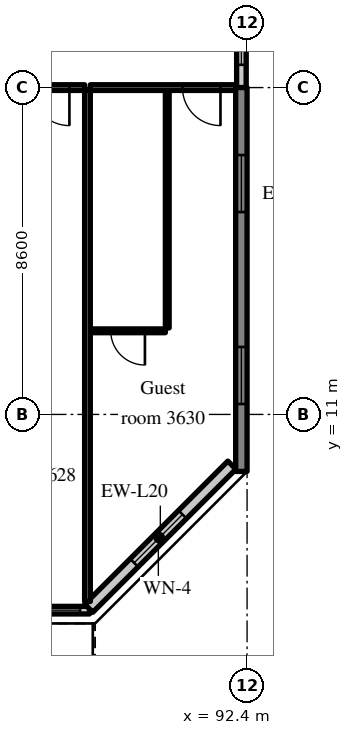
"""IFC4 building model, lengths in metres.
Left out: names, types, materials, properties, quantities, classifications, styles, units other than length and angle.
Written with IfcOpenShell. Run it as: python <this file> out.ifc"""

import sys

from ifc_helpers import new_model, si_unit, direction, frame, frame_2d, origin, place, context, subcontext, project, spatial, rectangle, extrude, source, transform, mapped, element, fill, save


model = new_model("IFC4")
c1 = context("Model", 3, precision=1e-05, world=origin(), true_north=direction((0.0, 1.0)))
c2 = subcontext(c1, "Body", "Model", "MODEL_VIEW")
j1 = project(units=[si_unit("LENGTHUNIT", "METRE"), si_unit("PLANEANGLEUNIT", "RADIAN")], contexts=[c1])
p1 = place(None, origin())
s1 = spatial("IfcSite", under=j1, at=p1, CompositionType="ELEMENT")
p2 = place(p1, origin())
s2 = spatial("IfcBuilding", under=s1, at=p2, CompositionType="ELEMENT")
p3 = place(p2, frame((0.0, 0.0, 151.6)))
s3 = spatial("IfcBuildingStorey", under=s2, at=p3, CompositionType="ELEMENT", Elevation=151.6)
m1 = source(origin(), c2, "Body", "SweptSolid", [
    extrude(rectangle(XDim=10.1, YDim=0.3, at=frame_2d((5.05, 0.0))), origin(), (0.0, 0.0, 1.0), 3.52),
])
p4 = place(p3, frame((92.25, 9.5, 0.0), z_axis=(0.0, 0.0, 1.0), x_axis=(0.0, 1.0, 0.0)))
e1 = element("IfcWall", 1, at=p4, inside=s3, PredefinedType="SHEAR", context=c2, shape_type="MappedRepresentation", body=[
    mapped(m1, transform((0.0, 0.0, 0.0), scale=1.0)),
])
m2 = source(origin(), c2, "Body", "SweptSolid", [
    extrude(rectangle(XDim=1.5, YDim=1.5, at=frame_2d((0.75, 0.75))), frame((0.0, 0.16, 0.0), z_axis=(0.0, -1.0, 0.0), x_axis=(1.0, 0.0, 0.0)), (0.0, 0.0, 1.0), 0.32),
])
p5 = place(p4, frame((1.775, 0.0, 0.9)))
e2 = element("IfcOpeningElement", 2, at=p5, cuts=e1, PredefinedType="OPENING", context=c2, shape_type="MappedRepresentation", body=[
    mapped(m2, transform((0.0, 0.0, 0.0), scale=1.0)),
])
p6 = place(p4, frame((6.825, 0.0, 0.9)))
e3 = element("IfcOpeningElement", 3, at=p6, cuts=e1, PredefinedType="OPENING", context=c2, shape_type="MappedRepresentation", body=[
    mapped(m2, transform((0.0, 0.0, 0.0), scale=1.0)),
])
m3 = source(origin(), c2, "Body", "SweptSolid", [
    extrude(rectangle(XDim=4.105, YDim=0.2, at=frame_2d((2.052, 0.0))), origin(), (0.0, 0.0, 1.0), 2.87),
])
p7 = place(p3, frame((84.15, 5.85, 0.0), z_axis=(0.0, 0.0, 1.0), x_axis=(1.0, 0.0, 0.0)))
e4 = element("IfcWall", 4, at=p7, inside=s3, PredefinedType="SOLIDWALL", context=c2, shape_type="MappedRepresentation", body=[
    mapped(m3, transform((0.0, 0.0, 0.0), scale=1.0)),
])
m4 = source(origin(), c2, "Body", "SweptSolid", [
    extrude(rectangle(XDim=1.2, YDim=2.4, at=frame_2d((0.6, 1.2))), frame((0.0, 0.11, 0.0), z_axis=(0.0, -1.0, 0.0), x_axis=(1.0, 0.0, 0.0)), (0.0, 0.0, 1.0), 0.22),
])
p8 = place(p7, frame((0.25, 0.0, 0.0)))
e5 = element("IfcOpeningElement", 5, at=p8, cuts=e4, PredefinedType="OPENING", context=c2, shape_type="MappedRepresentation", body=[
    mapped(m4, transform((0.0, 0.0, 0.0), scale=1.0)),
])
m5 = source(origin(), c2, "Body", "SweptSolid", [
    extrude(rectangle(XDim=1.5, YDim=1.5, at=frame_2d((0.75, 0.75))), frame((0.0, 0.11, 0.0), z_axis=(0.0, -1.0, 0.0), x_axis=(1.0, 0.0, 0.0)), (0.0, 0.0, 1.0), 0.22),
])
p9 = place(p7, frame((2.355, 0.0, 0.9)))
e6 = element("IfcOpeningElement", 6, at=p9, cuts=e4, PredefinedType="OPENING", context=c2, shape_type="MappedRepresentation", body=[
    mapped(m5, transform((0.0, 0.0, 0.0), scale=1.0)),
])
m6 = source(origin(), c2, "Body", "SweptSolid", [
    extrude(rectangle(XDim=5.326, YDim=0.3, at=frame_2d((2.663, 0.0))), origin(), (0.0, 0.0, 1.0), 3.52),
])
p10 = place(p3, frame((88.234, 5.9, 0.0), z_axis=(0.0, 0.0, 1.0), x_axis=(0.707083859269, 0.707129702361, 0.0)))
e7 = element("IfcWall", 7, at=p10, inside=s3, PredefinedType="SOLIDWALL", context=c2, shape_type="MappedRepresentation", body=[
    mapped(m6, transform((0.0, 0.0, 0.0), scale=1.0)),
])
m7 = source(origin(), c2, "Body", "SweptSolid", [
    extrude(rectangle(XDim=1.8, YDim=1.5, at=frame_2d((0.9, 0.75))), frame((0.0, 0.16, 0.0), z_axis=(0.0, -1.0, 0.0), x_axis=(1.0, 0.0, 0.0)), (0.0, 0.0, 1.0), 0.32),
])
p11 = place(p10, frame((1.689, 0.0, 0.9)))
e8 = element("IfcOpeningElement", 8, at=p11, cuts=e7, PredefinedType="OPENING", context=c2, shape_type="MappedRepresentation", body=[
    mapped(m7, transform((0.0, 0.0, 0.0), scale=1.0)),
])
m8 = source(origin(), c2, "Body", "SweptSolid", [
    extrude(rectangle(XDim=2.4, YDim=0.25, at=frame_2d((1.2, 0.0))), origin(), (0.0, 0.0, 1.0), 2.62),
])
p12 = place(p3, frame((92.25, 19.6, 0.0), z_axis=(0.0, 0.0, 1.0), x_axis=(0.0, 1.0, 0.0)))
e9 = element("IfcWall", 9, at=p12, inside=s3, PredefinedType="SOLIDWALL", context=c2, shape_type="MappedRepresentation", body=[
    mapped(m8, transform((0.0, 0.0, 0.0), scale=1.0)),
])
m9 = source(origin(), c2, "Body", "SweptSolid", [
    extrude(rectangle(XDim=1.2, YDim=1.5, at=frame_2d((0.6, 0.75))), frame((0.0, 0.135, 0.0), z_axis=(0.0, -1.0, 0.0), x_axis=(1.0, 0.0, 0.0)), (0.0, 0.0, 1.0), 0.27),
])
p13 = place(p12, frame((0.6, 0.0, 0.9)))
e10 = element("IfcOpeningElement", 10, at=p13, cuts=e9, PredefinedType="OPENING", context=c2, shape_type="MappedRepresentation", body=[
    mapped(m9, transform((0.0, 0.0, 0.0), scale=1.0)),
])
m10 = source(origin(), c2, "Body", "SweptSolid", [
    extrude(rectangle(XDim=3.975, YDim=0.15, at=frame_2d((1.988, 0.0))), origin(), (0.0, 0.0, 1.0), 2.82),
])
p14 = place(p3, frame((84.15, 19.6, 0.0), z_axis=(0.0, 0.0, 1.0), x_axis=(1.0, 0.0, 0.0)))
e11 = element("IfcWall", 11, at=p14, inside=s3, PredefinedType="PARTITIONING", context=c2, shape_type="MappedRepresentation", body=[
    mapped(m10, transform((0.0, 0.0, 0.0), scale=1.0)),
])
m11 = source(origin(), c2, "Body", "SweptSolid", [
    extrude(rectangle(XDim=1.0, YDim=2.1, at=frame_2d((0.5, 1.05))), frame((0.0, 0.085, 0.0), z_axis=(0.0, -1.0, 0.0), x_axis=(1.0, 0.0, 0.0)), (0.0, 0.0, 1.0), 0.17),
])
p15 = place(p14, frame((2.575, 0.0, 0.0)))
e12 = element("IfcOpeningElement", 12, at=p15, cuts=e11, PredefinedType="OPENING", context=c2, shape_type="MappedRepresentation", body=[
    mapped(m11, transform((0.0, 0.0, 0.0), scale=1.0)),
])
m12 = source(origin(), c2, "Body", "SweptSolid", [
    extrude(rectangle(XDim=6.25, YDim=0.1, at=frame_2d((3.125, 0.0))), origin(), (0.0, 0.0, 1.0), 3.52),
])
p16 = place(p3, frame((90.3, 13.275, 0.0), z_axis=(0.0, 0.0, 1.0), x_axis=(0.0, 1.0, 0.0)))
e13 = element("IfcWall", 13, at=p16, inside=s3, PredefinedType="PARTITIONING", context=c2, shape_type="MappedRepresentation", body=[
    mapped(m12, transform((0.0, 0.0, 0.0), scale=1.0)),
])
m13 = source(origin(), c2, "Body", "SweptSolid", [
    extrude(rectangle(XDim=1.975, YDim=0.1, at=frame_2d((0.988, 0.0))), origin(), (0.0, 0.0, 1.0), 3.52),
])
p17 = place(p3, frame((88.275, 13.2, 0.0), z_axis=(0.0, 0.0, 1.0), x_axis=(1.0, 0.0, 0.0)))
e14 = element("IfcWall", 14, at=p17, inside=s3, PredefinedType="PARTITIONING", context=c2, shape_type="MappedRepresentation", body=[
    mapped(m13, transform((0.0, 0.0, 0.0), scale=1.0)),
])
m14 = source(origin(), c2, "Body", "SweptSolid", [
    extrude(rectangle(XDim=0.9, YDim=2.1, at=frame_2d((0.45, 1.05))), frame((0.0, 0.06, 0.0), z_axis=(0.0, -1.0, 0.0), x_axis=(1.0, 0.0, 0.0)), (0.0, 0.0, 1.0), 0.12),
])
p18 = place(p17, frame((0.537, 0.0, 0.0)))
e15 = element("IfcOpeningElement", 15, at=p18, cuts=e14, PredefinedType="OPENING", context=c2, shape_type="MappedRepresentation", body=[
    mapped(m14, transform((0.0, 0.0, 0.0), scale=1.0)),
])
m15 = source(origin(), c2, "Body", "SweptSolid", [
    extrude(rectangle(XDim=3.825, YDim=0.15, at=frame_2d((1.913, 0.0))), origin(), (0.0, 0.0, 1.0), 2.82),
])
p19 = place(p3, frame((88.275, 19.6, 0.0), z_axis=(0.0, 0.0, 1.0), x_axis=(1.0, 0.0, 0.0)))
e16 = element("IfcWall", 16, at=p19, inside=s3, PredefinedType="PARTITIONING", context=c2, shape_type="MappedRepresentation", body=[
    mapped(m15, transform((0.0, 0.0, 0.0), scale=1.0)),
])
p20 = place(p19, frame((2.425, 0.0, 0.0)))
e17 = element("IfcOpeningElement", 17, at=p20, cuts=e16, PredefinedType="OPENING", context=c2, shape_type="MappedRepresentation", body=[
    mapped(m11, transform((0.0, 0.0, 0.0), scale=1.0)),
])
m16 = source(origin(), c2, "Body", "SweptSolid", [
    extrude(rectangle(XDim=13.447, YDim=0.15, at=frame_2d((6.724, 0.0))), origin(), (0.0, 0.0, 1.0), 3.52),
])
p21 = place(p3, frame((88.2, 6.078, 0.0), z_axis=(0.0, 0.0, 1.0), x_axis=(0.0, 1.0, 0.0)))
e18 = element("IfcWall", 18, at=p21, inside=s3, PredefinedType="PARTITIONING", context=c2, shape_type="MappedRepresentation", body=[
    mapped(m16, transform((0.0, 0.0, 0.0), scale=1.0)),
])
m17 = source(origin(), c2, "Body", "SweptSolid", [
    extrude(rectangle(XDim=1.5, YDim=1.5, at=frame_2d((0.75, 0.75))), frame((0.0, 0.03, 0.0), z_axis=(0.0, -1.0, 0.0), x_axis=(1.0, 0.0, 0.0)), (0.0, 0.0, 1.0), 0.06),
])
p22 = place(p9, origin())
e19 = element("IfcWindow", 19, at=p22, inside=s3, PartitioningType="SINGLE_PANEL", PredefinedType="WINDOW", context=c2, shape_type="MappedRepresentation", body=[
    mapped(m17, transform((0.0, 0.0, 0.0), scale=1.0)),
])
fill(e6, e19)
m18 = source(origin(), c2, "Body", "SweptSolid", [
    extrude(rectangle(XDim=1.8, YDim=1.5, at=frame_2d((0.9, 0.75))), frame((0.0, 0.03, 0.0), z_axis=(0.0, -1.0, 0.0), x_axis=(1.0, 0.0, 0.0)), (0.0, 0.0, 1.0), 0.06),
])
p23 = place(p11, origin())
e20 = element("IfcWindow", 20, at=p23, inside=s3, PartitioningType="SINGLE_PANEL", PredefinedType="WINDOW", context=c2, shape_type="MappedRepresentation", body=[
    mapped(m18, transform((0.0, 0.0, 0.0), scale=1.0)),
])
fill(e8, e20)
p24 = place(p5, origin())
e21 = element("IfcWindow", 21, at=p24, inside=s3, PartitioningType="SINGLE_PANEL", PredefinedType="WINDOW", context=c2, shape_type="MappedRepresentation", body=[
    mapped(m17, transform((0.0, 0.0, 0.0), scale=1.0)),
])
fill(e2, e21)
p25 = place(p6, origin())
e22 = element("IfcWindow", 22, at=p25, inside=s3, PartitioningType="SINGLE_PANEL", PredefinedType="WINDOW", context=c2, shape_type="MappedRepresentation", body=[
    mapped(m17, transform((0.0, 0.0, 0.0), scale=1.0)),
])
fill(e3, e22)
m19 = source(origin(), c2, "Body", "SweptSolid", [
    extrude(rectangle(XDim=1.2, YDim=1.5, at=frame_2d((0.6, 0.75))), frame((0.0, 0.03, 0.0), z_axis=(0.0, -1.0, 0.0), x_axis=(1.0, 0.0, 0.0)), (0.0, 0.0, 1.0), 0.06),
])
p26 = place(p13, origin())
e23 = element("IfcWindow", 23, at=p26, inside=s3, PartitioningType="SINGLE_PANEL", PredefinedType="WINDOW", context=c2, shape_type="MappedRepresentation", body=[
    mapped(m19, transform((0.0, 0.0, 0.0), scale=1.0)),
])
fill(e10, e23)
m20 = source(origin(), c2, "Body", "SweptSolid", [
    extrude(rectangle(XDim=1.0, YDim=2.1, at=frame_2d((0.5, 1.05))), frame((0.0, 0.025, 0.0), z_axis=(0.0, -1.0, 0.0), x_axis=(1.0, 0.0, 0.0)), (0.0, 0.0, 1.0), 0.05),
])
p27 = place(p15, origin())
e24 = element("IfcDoor", 24, at=p27, inside=s3, OperationType="SINGLE_SWING_RIGHT", PredefinedType="DOOR", context=c2, shape_type="MappedRepresentation", body=[
    mapped(m20, transform((0.0, 0.0, 0.0), scale=1.0)),
])
fill(e12, e24)
m21 = source(origin(), c2, "Body", "SweptSolid", [
    extrude(rectangle(XDim=0.9, YDim=2.1, at=frame_2d((0.45, 1.05))), frame((0.0, 0.025, 0.0), z_axis=(0.0, -1.0, 0.0), x_axis=(1.0, 0.0, 0.0)), (0.0, 0.0, 1.0), 0.05),
])
p28 = place(p18, origin())
e25 = element("IfcDoor", 25, at=p28, inside=s3, OperationType="SINGLE_SWING_RIGHT", PredefinedType="DOOR", context=c2, shape_type="MappedRepresentation", body=[
    mapped(m21, transform((0.0, 0.0, 0.0), scale=1.0)),
])
fill(e15, e25)
p29 = place(p20, origin())
e26 = element("IfcDoor", 26, at=p29, inside=s3, OperationType="SINGLE_SWING_RIGHT", PredefinedType="DOOR", context=c2, shape_type="MappedRepresentation", body=[
    mapped(m20, transform((0.0, 0.0, 0.0), scale=1.0)),
])
fill(e17, e26)
save(model, sys.argv[1])
